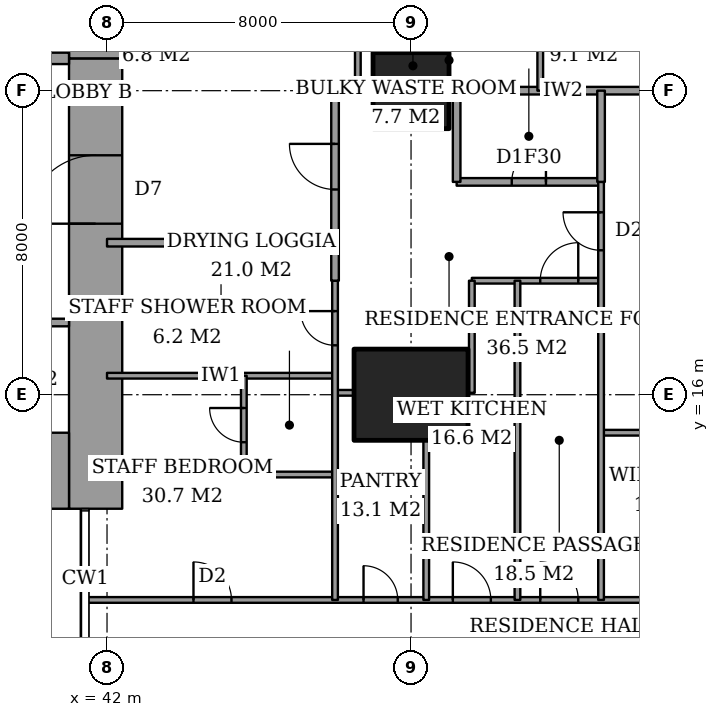
"""IFC4 building model, lengths in metres.
Left out: names, types, materials, properties, quantities, classifications, styles, units other than length and angle.
Written with IfcOpenShell. Run it as: python <this file> out.ifc"""

import sys

from ifc_helpers import new_model, si_unit, direction, frame, frame_2d, origin, origin_2d, place, context, subcontext, project, spatial, rectangle, extrude, element, fill, save


model = new_model("IFC4")
c1 = context("Model", 3, precision=1e-05, world=origin(), true_north=direction((0.0, 1.0)))
c2 = subcontext(c1, "Body", "Model", "MODEL_VIEW")
j1 = project(units=[si_unit("LENGTHUNIT", "METRE"), si_unit("PLANEANGLEUNIT", "RADIAN")], contexts=[c1])
p1 = place(None, origin())
s1 = spatial("IfcSite", under=j1, at=p1, CompositionType="ELEMENT")
p2 = place(p1, origin())
s2 = spatial("IfcBuilding", under=s1, at=p2, CompositionType="ELEMENT")
p3 = place(p2, frame((0.0, 0.0, 135.8)))
s3 = spatial("IfcBuildingStorey", under=s2, at=p3, CompositionType="ELEMENT", Elevation=135.8)
p4 = place(p3, frame((50.0, 16.0, 0.0), z_axis=(0.0, 0.0, 1.0), x_axis=(1.0, 0.0, 0.0)))
e1 = element("IfcColumn", 1, at=p4, inside=s3, PredefinedType="COLUMN", context=c2, shape_type="SweptSolid", body=[
    extrude(rectangle(XDim=3.0, YDim=2.4, at=origin_2d()), origin(), (0.0, 0.0, 1.0), 3.6),
])
p5 = place(p3, frame((50.0, 24.0, 0.0), z_axis=(0.0, 0.0, 1.0), x_axis=(1.0, 0.0, 0.0)))
e2 = element("IfcColumn", 2, at=p5, inside=s3, PredefinedType="COLUMN", context=c2, shape_type="SweptSolid", body=[
    extrude(rectangle(XDim=2.0, YDim=2.0, at=origin_2d()), origin(), (0.0, 0.0, 1.0), 3.6),
])
p6 = place(p3, frame((37.85, 14.0, 0.0), z_axis=(0.0, 0.0, 1.0), x_axis=(1.0, 0.0, 0.0)))
e3 = element("IfcWall", 3, at=p6, inside=s3, PredefinedType="SHEAR", context=c2, shape_type="SweptSolid", body=[
    extrude(rectangle(XDim=3.15, YDim=2.0, at=frame_2d((1.575, 0.0))), origin(), (0.0, 0.0, 1.0), 3.6),
])
p7 = place(p3, frame((41.7, 13.0, 0.0), z_axis=(0.0, 0.0, 1.0), x_axis=(0.0, 1.0, 0.0)))
e4 = element("IfcWall", 4, at=p7, inside=s3, PredefinedType="SHEAR", context=c2, shape_type="SweptSolid", body=[
    extrude(rectangle(XDim=11.85, YDim=1.4, at=frame_2d((5.925, 0.0))), origin(), (0.0, 0.0, 1.0), 3.6),
])
p8 = place(p7, frame((7.5, 0.0, 0.0)))
e5 = element("IfcOpeningElement", 5, at=p8, cuts=e4, PredefinedType="OPENING", context=c2, shape_type="SweptSolid", body=[
    extrude(rectangle(XDim=1.8, YDim=2.4, at=frame_2d((0.9, 1.2))), frame((0.0, 0.71, 0.0), z_axis=(0.0, -1.0, 0.0), x_axis=(1.0, 0.0, 0.0)), (0.0, 0.0, 1.0), 1.42),
])
p9 = place(p3, frame((41.7, 24.85, 0.0), z_axis=(0.0, 0.0, 1.0), x_axis=(0.0, 1.0, 0.0)))
e6 = element("IfcWall", 6, at=p9, inside=s3, PredefinedType="SHEAR", context=c2, shape_type="SweptSolid", body=[
    extrude(rectangle(XDim=10.15, YDim=1.4, at=frame_2d((5.075, 0.0))), origin(), (0.0, 0.0, 1.0), 3.6),
])
p10 = place(p3, frame((37.85, 24.85, 0.0), z_axis=(0.0, 0.0, 1.0), x_axis=(1.0, 0.0, 0.0)))
e7 = element("IfcWall", 7, at=p10, inside=s3, PredefinedType="SHEAR", context=c2, shape_type="SweptSolid", body=[
    extrude(rectangle(XDim=3.15, YDim=0.3, at=frame_2d((1.575, 0.0))), origin(), (0.0, 0.0, 1.0), 3.6),
])
p11 = place(p10, frame((0.95, 0.0, 0.0)))
e8 = element("IfcOpeningElement", 8, at=p11, cuts=e7, PredefinedType="OPENING", context=c2, shape_type="SweptSolid", body=[
    extrude(rectangle(XDim=1.0, YDim=2.1, at=frame_2d((0.5, 1.05))), frame((0.0, 0.16, 0.0), z_axis=(0.0, -1.0, 0.0), x_axis=(1.0, 0.0, 0.0)), (0.0, 0.0, 1.0), 0.32),
])
p12 = place(p3, frame((41.439, 10.6, 0.0), z_axis=(0.0, 0.0, 1.0), x_axis=(1.0, 0.0, 0.0)))
e9 = element("IfcWall", 9, at=p12, inside=s3, PredefinedType="PARTITIONING", context=c2, shape_type="SweptSolid", body=[
    extrude(rectangle(XDim=25.011, YDim=0.15, at=frame_2d((12.505, 0.0))), origin(), (0.0, 0.0, 1.0), 3.35),
])
p13 = place(p12, frame((11.961, 0.0, 0.0)))
e10 = element("IfcOpeningElement", 10, at=p13, cuts=e9, PredefinedType="OPENING", context=c2, shape_type="SweptSolid", body=[
    extrude(rectangle(XDim=1.0, YDim=2.1, at=frame_2d((0.5, 1.05))), frame((0.0, 0.085, 0.0), z_axis=(0.0, -1.0, 0.0), x_axis=(1.0, 0.0, 0.0)), (0.0, 0.0, 1.0), 0.17),
])
p14 = place(p12, frame((20.924, 0.0, 0.0)))
e11 = element("IfcOpeningElement", 11, at=p14, cuts=e9, PredefinedType="OPENING", context=c2, shape_type="SweptSolid", body=[
    extrude(rectangle(XDim=1.0, YDim=2.1, at=frame_2d((0.5, 1.05))), frame((0.0, 0.085, 0.0), z_axis=(0.0, -1.0, 0.0), x_axis=(1.0, 0.0, 0.0)), (0.0, 0.0, 1.0), 0.17),
])
p15 = place(p12, frame((15.249, 0.0, 0.0)))
e12 = element("IfcOpeningElement", 12, at=p15, cuts=e9, PredefinedType="OPENING", context=c2, shape_type="SweptSolid", body=[
    extrude(rectangle(XDim=0.9, YDim=2.1, at=frame_2d((0.45, 1.05))), frame((0.0, 0.085, 0.0), z_axis=(0.0, -1.0, 0.0), x_axis=(1.0, 0.0, 0.0)), (0.0, 0.0, 1.0), 0.17),
])
p16 = place(p12, frame((9.661, 0.0, 0.0)))
e13 = element("IfcOpeningElement", 13, at=p16, cuts=e9, PredefinedType="OPENING", context=c2, shape_type="SweptSolid", body=[
    extrude(rectangle(XDim=1.0, YDim=2.1, at=frame_2d((0.5, 1.05))), frame((0.0, 0.085, 0.0), z_axis=(0.0, -1.0, 0.0), x_axis=(1.0, 0.0, 0.0)), (0.0, 0.0, 1.0), 0.17),
])
p17 = place(p12, frame((7.311, 0.0, 0.0)))
e14 = element("IfcOpeningElement", 14, at=p17, cuts=e9, PredefinedType="OPENING", context=c2, shape_type="SweptSolid", body=[
    extrude(rectangle(XDim=0.9, YDim=2.1, at=frame_2d((0.45, 1.05))), frame((0.0, 0.085, 0.0), z_axis=(0.0, -1.0, 0.0), x_axis=(1.0, 0.0, 0.0)), (0.0, 0.0, 1.0), 0.17),
])
p18 = place(p12, frame((2.836, 0.0, 0.0)))
e15 = element("IfcOpeningElement", 15, at=p18, cuts=e9, PredefinedType="OPENING", context=c2, shape_type="SweptSolid", body=[
    extrude(rectangle(XDim=1.0, YDim=2.1, at=frame_2d((0.5, 1.05))), frame((0.0, 0.085, 0.0), z_axis=(0.0, -1.0, 0.0), x_axis=(1.0, 0.0, 0.0)), (0.0, 0.0, 1.0), 0.17),
])
p19 = place(p3, frame((45.6, 13.9, 0.0), z_axis=(0.0, 0.0, 1.0), x_axis=(1.0, 0.0, 0.0)))
e16 = element("IfcWall", 16, at=p19, inside=s3, PredefinedType="PARTITIONING", context=c2, shape_type="SweptSolid", body=[
    extrude(rectangle(XDim=2.4, YDim=0.15, at=frame_2d((1.2, 0.0))), origin(), (0.0, 0.0, 1.0), 3.35),
])
p20 = place(p3, frame((55.0, 15.0, 0.0), z_axis=(0.0, 0.0, 1.0), x_axis=(1.0, 0.0, 0.0)))
e17 = element("IfcWall", 17, at=p20, inside=s3, PredefinedType="PARTITIONING", context=c2, shape_type="SweptSolid", body=[
    extrude(rectangle(XDim=1.5, YDim=0.15, at=frame_2d((0.75, 0.0))), origin(), (0.0, 0.0, 1.0), 3.35),
])
p21 = place(p3, frame((48.0, 16.05, 0.0), z_axis=(0.0, 0.0, 1.0), x_axis=(1.0, 0.0, 0.0)))
e18 = element("IfcWall", 18, at=p21, inside=s3, PredefinedType="PARTITIONING", context=c2, shape_type="SweptSolid", body=[
    extrude(rectangle(XDim=0.5, YDim=0.15, at=frame_2d((0.25, 0.0))), origin(), (0.0, 0.0, 1.0), 2.634),
])
p22 = place(p3, frame((42.0, 16.5, 0.0), z_axis=(0.0, 0.0, 1.0), x_axis=(1.0, 0.0, 0.0)))
e19 = element("IfcWall", 19, at=p22, inside=s3, PredefinedType="PARTITIONING", context=c2, shape_type="SweptSolid", body=[
    extrude(rectangle(XDim=6.0, YDim=0.15, at=frame_2d((3.0, 0.0))), origin(), (0.0, 0.0, 1.0), 3.35),
])
p23 = place(p3, frame((51.6, 19.0, 0.0), z_axis=(0.0, 0.0, 1.0), x_axis=(1.0, 0.0, 0.0)))
e20 = element("IfcWall", 20, at=p23, inside=s3, PredefinedType="PARTITIONING", context=c2, shape_type="SweptSolid", body=[
    extrude(rectangle(XDim=3.4, YDim=0.15, at=frame_2d((1.7, 0.0))), origin(), (0.0, 0.0, 1.0), 3.35),
])
p24 = place(p23, frame((1.8, 0.0, 0.0)))
e21 = element("IfcOpeningElement", 21, at=p24, cuts=e20, PredefinedType="OPENING", context=c2, shape_type="SweptSolid", body=[
    extrude(rectangle(XDim=1.0, YDim=2.1, at=frame_2d((0.5, 1.05))), frame((0.0, 0.085, 0.0), z_axis=(0.0, -1.0, 0.0), x_axis=(1.0, 0.0, 0.0)), (0.0, 0.0, 1.0), 0.17),
])
p25 = place(p3, frame((42.0, 20.0, 0.0), z_axis=(0.0, 0.0, 1.0), x_axis=(1.0, 0.0, 0.0)))
e22 = element("IfcWall", 22, at=p25, inside=s3, PredefinedType="PARTITIONING", context=c2, shape_type="SweptSolid", body=[
    extrude(rectangle(XDim=6.0, YDim=0.2, at=frame_2d((3.0, 0.0))), origin(), (0.0, 0.0, 1.0), 3.35),
])
p26 = place(p3, frame((51.2, 21.6, 0.0), z_axis=(0.0, 0.0, 1.0), x_axis=(1.0, 0.0, 0.0)))
e23 = element("IfcWall", 23, at=p26, inside=s3, PredefinedType="PARTITIONING", context=c2, shape_type="SweptSolid", body=[
    extrude(rectangle(XDim=3.8, YDim=0.2, at=frame_2d((1.9, 0.0))), origin(), (0.0, 0.0, 1.0), 3.35),
])
p27 = place(p26, frame((1.45, 0.0, 0.0)))
e24 = element("IfcOpeningElement", 24, at=p27, cuts=e23, PredefinedType="OPENING", context=c2, shape_type="SweptSolid", body=[
    extrude(rectangle(XDim=0.9, YDim=2.1, at=frame_2d((0.45, 1.05))), frame((0.0, 0.11, 0.0), z_axis=(0.0, -1.0, 0.0), x_axis=(1.0, 0.0, 0.0)), (0.0, 0.0, 1.0), 0.22),
])
p28 = place(p3, frame((48.0, 24.0, 0.0), z_axis=(0.0, 0.0, 1.0), x_axis=(1.0, 0.0, 0.0)))
e25 = element("IfcWall", 25, at=p28, inside=s3, PredefinedType="PARTITIONING", context=c2, shape_type="SweptSolid", body=[
    extrude(rectangle(XDim=1.0, YDim=0.2, at=frame_2d((0.5, 0.0))), origin(), (0.0, 0.0, 1.0), 3.35),
])
p29 = place(p3, frame((51.0, 24.0, 0.0), z_axis=(0.0, 0.0, 1.0), x_axis=(1.0, 0.0, 0.0)))
e26 = element("IfcWall", 26, at=p29, inside=s3, PredefinedType="PARTITIONING", context=c2, shape_type="SweptSolid", body=[
    extrude(rectangle(XDim=6.0, YDim=0.2, at=frame_2d((3.0, 0.0))), origin(), (0.0, 0.0, 1.0), 3.35),
])
p30 = place(p3, frame((45.6, 13.9, 0.0), z_axis=(0.0, 0.0, 1.0), x_axis=(0.0, 1.0, 0.0)))
e27 = element("IfcWall", 27, at=p30, inside=s3, PredefinedType="PARTITIONING", context=c2, shape_type="SweptSolid", body=[
    extrude(rectangle(XDim=2.6, YDim=0.15, at=frame_2d((1.3, 0.0))), origin(), (0.0, 0.0, 1.0), 3.35),
])
p31 = place(p30, frame((0.85, 0.0, 0.0)))
e28 = element("IfcOpeningElement", 28, at=p31, cuts=e27, PredefinedType="OPENING", context=c2, shape_type="SweptSolid", body=[
    extrude(rectangle(XDim=0.9, YDim=2.1, at=frame_2d((0.45, 1.05))), frame((0.0, 0.085, 0.0), z_axis=(0.0, -1.0, 0.0), x_axis=(1.0, 0.0, 0.0)), (0.0, 0.0, 1.0), 0.17),
])
p32 = place(p3, frame((48.0, 19.0, 0.0), z_axis=(0.0, 0.0, 1.0), x_axis=(0.0, 1.0, 0.0)))
e29 = element("IfcWall", 29, at=p32, inside=s3, PredefinedType="PARTITIONING", context=c2, shape_type="SweptSolid", body=[
    extrude(rectangle(XDim=5.0, YDim=0.2, at=frame_2d((2.5, 0.0))), origin(), (0.0, 0.0, 1.0), 3.35),
])
p33 = place(p32, frame((2.4, 0.0, 0.0)))
e30 = element("IfcOpeningElement", 30, at=p33, cuts=e29, PredefinedType="OPENING", context=c2, shape_type="SweptSolid", body=[
    extrude(rectangle(XDim=1.2, YDim=2.4, at=frame_2d((0.6, 1.2))), frame((0.0, 0.11, 0.0), z_axis=(0.0, -1.0, 0.0), x_axis=(1.0, 0.0, 0.0)), (0.0, 0.0, 1.0), 0.22),
])
p34 = place(p3, frame((48.0, 10.6, 0.0), z_axis=(0.0, 0.0, 1.0), x_axis=(0.0, 1.0, 0.0)))
e31 = element("IfcWall", 31, at=p34, inside=s3, PredefinedType="PARTITIONING", context=c2, shape_type="SweptSolid", body=[
    extrude(rectangle(XDim=8.4, YDim=0.15, at=frame_2d((4.2, 0.0))), origin(), (0.0, 0.0, 1.0), 3.35),
])
p35 = place(p34, frame((6.7, 0.0, 0.0)))
e32 = element("IfcOpeningElement", 32, at=p35, cuts=e31, PredefinedType="OPENING", context=c2, shape_type="SweptSolid", body=[
    extrude(rectangle(XDim=0.9, YDim=2.1, at=frame_2d((0.45, 1.05))), frame((0.0, 0.085, 0.0), z_axis=(0.0, -1.0, 0.0), x_axis=(1.0, 0.0, 0.0)), (0.0, 0.0, 1.0), 0.17),
])
p36 = place(p3, frame((48.6, 24.0, 0.0), z_axis=(0.0, 0.0, 1.0), x_axis=(0.0, 1.0, 0.0)))
e33 = element("IfcWall", 33, at=p36, inside=s3, PredefinedType="PARTITIONING", context=c2, shape_type="SweptSolid", body=[
    extrude(rectangle(XDim=1.6, YDim=0.15, at=frame_2d((0.8, 0.0))), origin(), (0.0, 0.0, 1.0), 3.35),
])
p37 = place(p3, frame((50.4, 10.6, 0.0), z_axis=(0.0, 0.0, 1.0), x_axis=(0.0, 1.0, 0.0)))
e34 = element("IfcWall", 34, at=p37, inside=s3, PredefinedType="PARTITIONING", context=c2, shape_type="SweptSolid", body=[
    extrude(rectangle(XDim=4.2, YDim=0.15, at=frame_2d((2.1, 0.0))), origin(), (0.0, 0.0, 1.0), 3.35),
])
p38 = place(p3, frame((51.2, 21.6, 0.0), z_axis=(0.0, 0.0, 1.0), x_axis=(0.0, 1.0, 0.0)))
e35 = element("IfcWall", 35, at=p38, inside=s3, PredefinedType="PARTITIONING", context=c2, shape_type="SweptSolid", body=[
    extrude(rectangle(XDim=2.4, YDim=0.2, at=frame_2d((1.2, 0.0))), origin(), (0.0, 0.0, 1.0), 3.35),
])
p39 = place(p3, frame((51.6, 16.05, 0.0), z_axis=(0.0, 0.0, 1.0), x_axis=(0.0, 1.0, 0.0)))
e36 = element("IfcWall", 36, at=p39, inside=s3, PredefinedType="PARTITIONING", context=c2, shape_type="SweptSolid", body=[
    extrude(rectangle(XDim=2.95, YDim=0.15, at=frame_2d((1.475, 0.0))), origin(), (0.0, 0.0, 1.0), 3.35),
])
p40 = place(p3, frame((52.8, 10.6, 0.0), z_axis=(0.0, 0.0, 1.0), x_axis=(0.0, 1.0, 0.0)))
e37 = element("IfcWall", 37, at=p40, inside=s3, PredefinedType="PARTITIONING", context=c2, shape_type="SweptSolid", body=[
    extrude(rectangle(XDim=8.4, YDim=0.15, at=frame_2d((4.2, 0.0))), origin(), (0.0, 0.0, 1.0), 3.35),
])
p41 = place(p3, frame((53.4, 24.0, 0.0), z_axis=(0.0, 0.0, 1.0), x_axis=(0.0, 1.0, 0.0)))
e38 = element("IfcWall", 38, at=p41, inside=s3, PredefinedType="PARTITIONING", context=c2, shape_type="SweptSolid", body=[
    extrude(rectangle(XDim=1.6, YDim=0.15, at=frame_2d((0.8, 0.0))), origin(), (0.0, 0.0, 1.0), 3.35),
])
p42 = place(p3, frame((55.0, 21.6, 0.0), z_axis=(0.0, 0.0, 1.0), x_axis=(0.0, 1.0, 0.0)))
e39 = element("IfcWall", 39, at=p42, inside=s3, PredefinedType="PARTITIONING", context=c2, shape_type="SweptSolid", body=[
    extrude(rectangle(XDim=2.4, YDim=0.2, at=frame_2d((1.2, 0.0))), origin(), (0.0, 0.0, 1.0), 3.35),
])
p43 = place(p3, frame((55.0, 10.6, 0.0), z_axis=(0.0, 0.0, 1.0), x_axis=(0.0, 1.0, 0.0)))
e40 = element("IfcWall", 40, at=p43, inside=s3, PredefinedType="PARTITIONING", context=c2, shape_type="SweptSolid", body=[
    extrude(rectangle(XDim=11.0, YDim=0.15, at=frame_2d((5.5, 0.0))), origin(), (0.0, 0.0, 1.0), 3.35),
])
p44 = place(p43, frame((9.2, 0.0, 0.0)))
e41 = element("IfcOpeningElement", 41, at=p44, cuts=e40, PredefinedType="OPENING", context=c2, shape_type="SweptSolid", body=[
    extrude(rectangle(XDim=1.0, YDim=2.1, at=frame_2d((0.5, 1.05))), frame((0.0, 0.085, 0.0), z_axis=(0.0, -1.0, 0.0), x_axis=(1.0, 0.0, 0.0)), (0.0, 0.0, 1.0), 0.17),
])
p45 = place(p3, frame((28.3, 17.9, 0.0), z_axis=(0.0, 0.0, 1.0), x_axis=(1.0, 0.0, 0.0)))
e42 = element("IfcWall", 42, at=p45, inside=s3, PredefinedType="PARTITIONING", context=c2, shape_type="SweptSolid", body=[
    extrude(rectangle(XDim=12.7, YDim=0.2, at=frame_2d((6.35, 0.0))), origin(), (0.0, 0.0, 1.0), 3.6),
])
p46 = place(p45, frame((0.95, 0.0, 0.0)))
e43 = element("IfcOpeningElement", 43, at=p46, cuts=e42, PredefinedType="OPENING", context=c2, shape_type="SweptSolid", body=[
    extrude(rectangle(XDim=1.1, YDim=2.1, at=frame_2d((0.55, 1.05))), frame((0.0, 0.11, 0.0), z_axis=(0.0, -1.0, 0.0), x_axis=(1.0, 0.0, 0.0)), (0.0, 0.0, 1.0), 0.22),
])
p47 = place(p45, frame((4.15, 0.0, 0.0)))
e44 = element("IfcOpeningElement", 44, at=p47, cuts=e42, PredefinedType="OPENING", context=c2, shape_type="SweptSolid", body=[
    extrude(rectangle(XDim=1.1, YDim=2.1, at=frame_2d((0.55, 1.05))), frame((0.0, 0.11, 0.0), z_axis=(0.0, -1.0, 0.0), x_axis=(1.0, 0.0, 0.0)), (0.0, 0.0, 1.0), 0.22),
])
p48 = place(p45, frame((7.35, 0.0, 0.0)))
e45 = element("IfcOpeningElement", 45, at=p48, cuts=e42, PredefinedType="OPENING", context=c2, shape_type="SweptSolid", body=[
    extrude(rectangle(XDim=1.1, YDim=2.1, at=frame_2d((0.55, 1.05))), frame((0.0, 0.11, 0.0), z_axis=(0.0, -1.0, 0.0), x_axis=(1.0, 0.0, 0.0)), (0.0, 0.0, 1.0), 0.22),
])
p49 = place(p45, frame((10.6, 0.0, 0.0)))
e46 = element("IfcOpeningElement", 46, at=p49, cuts=e42, PredefinedType="OPENING", context=c2, shape_type="SweptSolid", body=[
    extrude(rectangle(XDim=1.2, YDim=2.1, at=frame_2d((0.6, 1.05))), frame((0.0, 0.11, 0.0), z_axis=(0.0, -1.0, 0.0), x_axis=(1.0, 0.0, 0.0)), (0.0, 0.0, 1.0), 0.22),
])
p50 = place(p13, origin())
e47 = element("IfcDoor", 47, at=p50, inside=s3, OperationType="SINGLE_SWING_RIGHT", PredefinedType="DOOR", context=c2, shape_type="SweptSolid", body=[
    extrude(rectangle(XDim=1.0, YDim=2.1, at=frame_2d((0.5, 1.05))), frame((0.0, 0.025, 0.0), z_axis=(0.0, -1.0, 0.0), x_axis=(1.0, 0.0, 0.0)), (0.0, 0.0, 1.0), 0.05),
])
fill(e10, e47)
p51 = place(p44, origin())
e48 = element("IfcDoor", 48, at=p51, inside=s3, OperationType="SINGLE_SWING_LEFT", PredefinedType="DOOR", context=c2, shape_type="SweptSolid", body=[
    extrude(rectangle(XDim=1.0, YDim=2.1, at=frame_2d((0.5, 1.05))), frame((0.0, 0.025, 0.0), z_axis=(0.0, -1.0, 0.0), x_axis=(1.0, 0.0, 0.0)), (0.0, 0.0, 1.0), 0.05),
])
fill(e41, e48)
p52 = place(p27, origin())
e49 = element("IfcDoor", 49, at=p52, inside=s3, OperationType="SINGLE_SWING_LEFT", PredefinedType="DOOR", context=c2, shape_type="SweptSolid", body=[
    extrude(rectangle(XDim=0.9, YDim=2.1, at=frame_2d((0.45, 1.05))), frame((0.0, 0.025, 0.0), z_axis=(0.0, -1.0, 0.0), x_axis=(1.0, 0.0, 0.0)), (0.0, 0.0, 1.0), 0.05),
])
fill(e24, e49)
p53 = place(p33, origin())
e50 = element("IfcDoor", 50, at=p53, inside=s3, OperationType="SINGLE_SWING_LEFT", PredefinedType="DOOR", context=c2, shape_type="SweptSolid", body=[
    extrude(rectangle(XDim=1.2, YDim=2.4, at=frame_2d((0.6, 1.2))), frame((0.0, 0.025, 0.0), z_axis=(0.0, -1.0, 0.0), x_axis=(1.0, 0.0, 0.0)), (0.0, 0.0, 1.0), 0.05),
])
fill(e30, e50)
p54 = place(p24, origin())
e51 = element("IfcDoor", 51, at=p54, inside=s3, OperationType="SINGLE_SWING_LEFT", PredefinedType="DOOR", context=c2, shape_type="SweptSolid", body=[
    extrude(rectangle(XDim=1.0, YDim=2.1, at=frame_2d((0.5, 1.05))), frame((0.0, 0.025, 0.0), z_axis=(0.0, -1.0, 0.0), x_axis=(1.0, 0.0, 0.0)), (0.0, 0.0, 1.0), 0.05),
])
fill(e21, e51)
p55 = place(p16, origin())
e52 = element("IfcDoor", 52, at=p55, inside=s3, OperationType="SINGLE_SWING_RIGHT", PredefinedType="DOOR", context=c2, shape_type="SweptSolid", body=[
    extrude(rectangle(XDim=1.0, YDim=2.1, at=frame_2d((0.5, 1.05))), frame((0.0, 0.025, 0.0), z_axis=(0.0, -1.0, 0.0), x_axis=(1.0, 0.0, 0.0)), (0.0, 0.0, 1.0), 0.05),
])
fill(e13, e52)
p56 = place(p17, origin())
e53 = element("IfcDoor", 53, at=p56, inside=s3, OperationType="SINGLE_SWING_RIGHT", PredefinedType="DOOR", context=c2, shape_type="SweptSolid", body=[
    extrude(rectangle(XDim=0.9, YDim=2.1, at=frame_2d((0.45, 1.05))), frame((0.0, 0.025, 0.0), z_axis=(0.0, -1.0, 0.0), x_axis=(1.0, 0.0, 0.0)), (0.0, 0.0, 1.0), 0.05),
])
fill(e14, e53)
p57 = place(p31, origin())
e54 = element("IfcDoor", 54, at=p57, inside=s3, OperationType="SINGLE_SWING_LEFT", PredefinedType="DOOR", context=c2, shape_type="SweptSolid", body=[
    extrude(rectangle(XDim=0.9, YDim=2.1, at=frame_2d((0.45, 1.05))), frame((0.0, 0.025, 0.0), z_axis=(0.0, -1.0, 0.0), x_axis=(1.0, 0.0, 0.0)), (0.0, 0.0, 1.0), 0.05),
])
fill(e28, e54)
p58 = place(p18, origin())
e55 = element("IfcDoor", 55, at=p58, inside=s3, OperationType="SINGLE_SWING_RIGHT", PredefinedType="DOOR", context=c2, shape_type="SweptSolid", body=[
    extrude(rectangle(XDim=1.0, YDim=2.1, at=frame_2d((0.5, 1.05))), frame((0.0, 0.025, 0.0), z_axis=(0.0, -1.0, 0.0), x_axis=(1.0, 0.0, 0.0)), (0.0, 0.0, 1.0), 0.05),
])
fill(e15, e55)
p59 = place(p35, origin())
e56 = element("IfcDoor", 56, at=p59, inside=s3, OperationType="SINGLE_SWING_LEFT", PredefinedType="DOOR", context=c2, shape_type="SweptSolid", body=[
    extrude(rectangle(XDim=0.9, YDim=2.1, at=frame_2d((0.45, 1.05))), frame((0.0, 0.025, 0.0), z_axis=(0.0, -1.0, 0.0), x_axis=(1.0, 0.0, 0.0)), (0.0, 0.0, 1.0), 0.05),
])
fill(e32, e56)
p60 = place(p8, origin())
e57 = element("IfcDoor", 57, at=p60, inside=s3, OperationType="DOUBLE_DOOR_DOUBLE_SWING", PredefinedType="DOOR", context=c2, shape_type="SweptSolid", body=[
    extrude(rectangle(XDim=1.8, YDim=2.4, at=frame_2d((0.9, 1.2))), frame((0.0, 0.025, 0.0), z_axis=(0.0, -1.0, 0.0), x_axis=(1.0, 0.0, 0.0)), (0.0, 0.0, 1.0), 0.05),
])
fill(e5, e57)
save(model, sys.argv[1])
